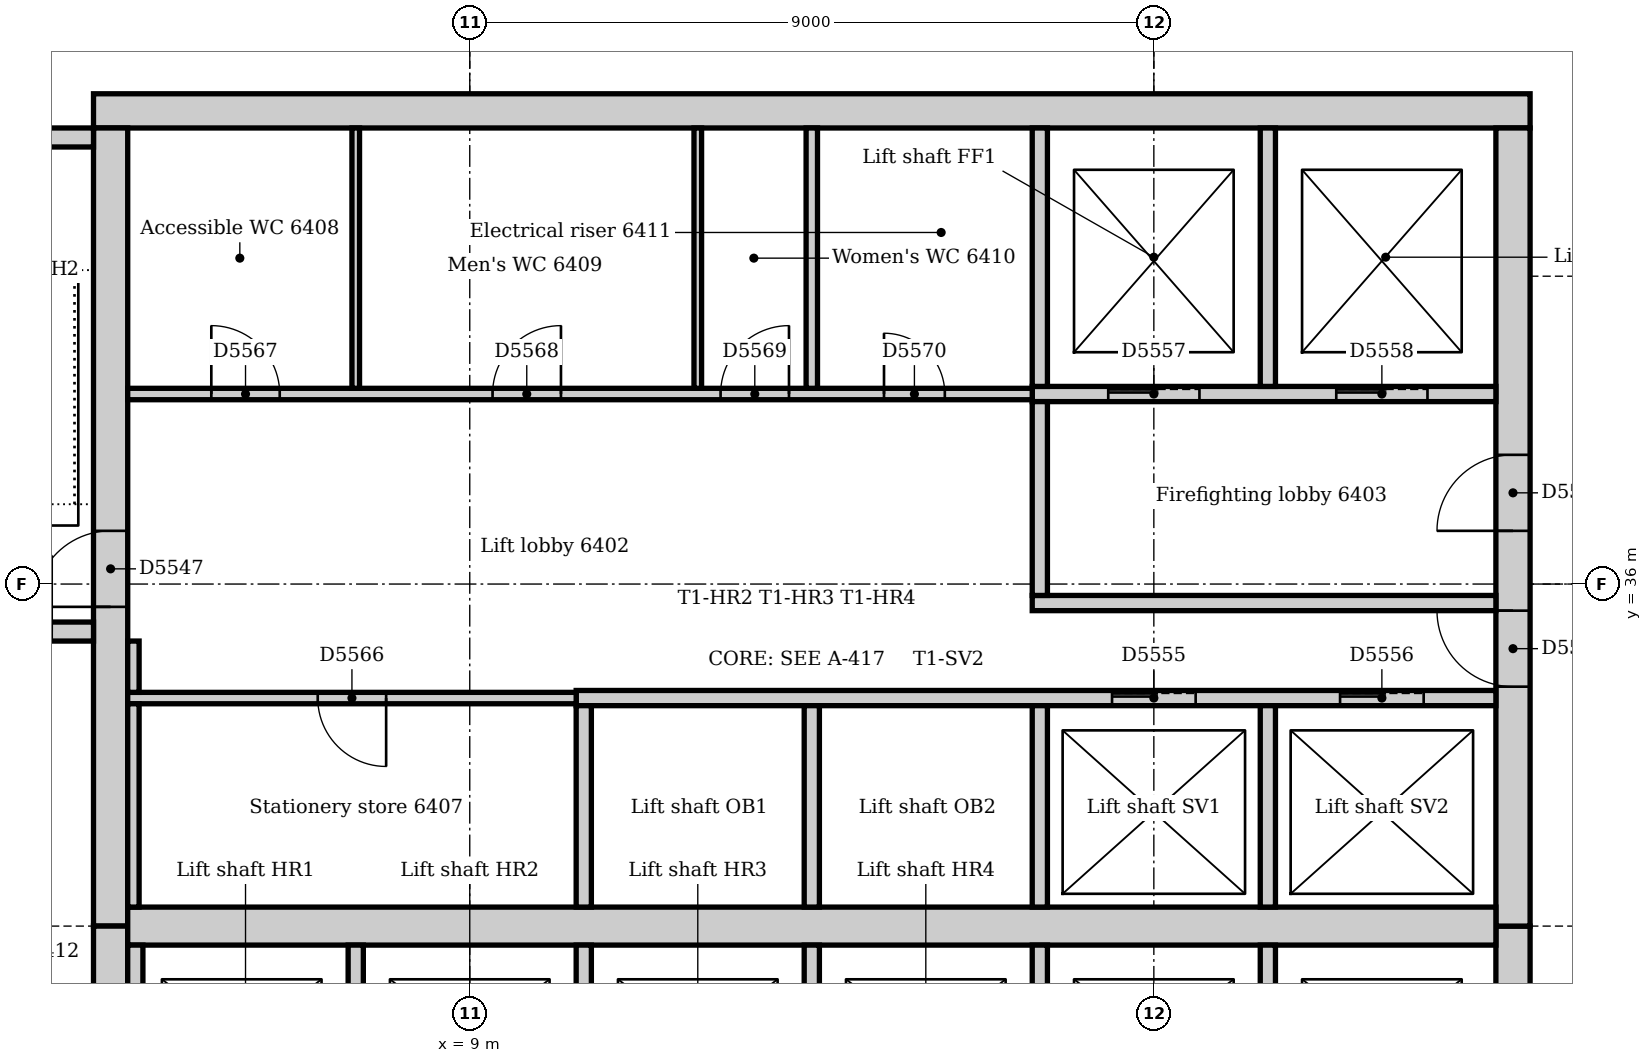
"""IFC4 building model, lengths in metres.
Left out: names, types, materials, properties, quantities, classifications, styles, units other than length and angle.
Written with IfcOpenShell. Run it as: python <this file> out.ifc"""

import sys

from ifc_helpers import new_model, si_unit, direction, frame, frame_2d, origin, place, context, subcontext, project, spatial, rectangle, extrude, element, fill, save


model = new_model("IFC4")
c1 = context("Model", 3, precision=1e-05, world=origin(), true_north=direction((0.0, 1.0)))
c2 = subcontext(c1, "Body", "Model", "MODEL_VIEW")
j1 = project(units=[si_unit("LENGTHUNIT", "METRE"), si_unit("PLANEANGLEUNIT", "RADIAN")], contexts=[c1])
p1 = place(None, origin())
s1 = spatial("IfcSite", under=j1, at=p1, CompositionType="ELEMENT")
p2 = place(p1, origin())
s2 = spatial("IfcBuilding", under=s1, at=p2, CompositionType="ELEMENT")
p3 = place(p2, frame((0.0, 0.0, 267.0)))
s3 = spatial("IfcBuildingStorey", under=s2, at=p3, CompositionType="ELEMENT", Elevation=267.0)
p4 = place(p3, frame((22.95, 42.225, 0.0), z_axis=(0.0, 0.0, 1.0), x_axis=(-1.0, 0.0, 0.0)))
e1 = element("IfcWall", 1, at=p4, inside=s3, PredefinedType="SOLIDWALL", context=c2, shape_type="SweptSolid", body=[
    extrude(rectangle(XDim=18.9, YDim=0.45, at=frame_2d((9.45, 0.0))), origin(), (0.0, 0.0, 1.0), 4.0),
])
p5 = place(p3, frame((22.725, 21.0, 0.0), z_axis=(0.0, 0.0, 1.0), x_axis=(0.0, 1.0, 0.0)))
e2 = element("IfcWall", 2, at=p5, inside=s3, PredefinedType="SOLIDWALL", context=c2, shape_type="SweptSolid", body=[
    extrude(rectangle(XDim=10.5, YDim=0.45, at=frame_2d((5.25, 0.0))), origin(), (0.0, 0.0, 1.0), 4.0),
])
p6 = place(p5, frame((4.35, 0.0, 0.0)))
e3 = element("IfcOpeningElement", 3, at=p6, cuts=e2, PredefinedType="OPENING", context=c2, shape_type="SweptSolid", body=[
    extrude(rectangle(XDim=1.8, YDim=2.1, at=frame_2d((0.9, 1.05))), frame((0.0, 0.235, 0.0), z_axis=(0.0, -1.0, 0.0), x_axis=(1.0, 0.0, 0.0)), (0.0, 0.0, 1.0), 0.47),
])
p7 = place(p3, frame((22.725, 31.5, 0.0), z_axis=(0.0, 0.0, 1.0), x_axis=(0.0, 1.0, 0.0)))
e4 = element("IfcWall", 4, at=p7, inside=s3, PredefinedType="SOLIDWALL", context=c2, shape_type="SweptSolid", body=[
    extrude(rectangle(XDim=10.5, YDim=0.45, at=frame_2d((5.25, 0.0))), origin(), (0.0, 0.0, 1.0), 4.0),
])
p8 = place(p7, frame((3.15, 0.0, 0.0)))
e5 = element("IfcOpeningElement", 5, at=p8, cuts=e4, PredefinedType="OPENING", context=c2, shape_type="SweptSolid", body=[
    extrude(rectangle(XDim=1.0, YDim=2.1, at=frame_2d((0.5, 1.05))), frame((0.0, 0.235, 0.0), z_axis=(0.0, -1.0, 0.0), x_axis=(1.0, 0.0, 0.0)), (0.0, 0.0, 1.0), 0.47),
])
p9 = place(p7, frame((5.2, 0.0, 0.0)))
e6 = element("IfcOpeningElement", 6, at=p9, cuts=e4, PredefinedType="OPENING", context=c2, shape_type="SweptSolid", body=[
    extrude(rectangle(XDim=1.0, YDim=2.1, at=frame_2d((0.5, 1.05))), frame((0.0, 0.235, 0.0), z_axis=(0.0, -1.0, 0.0), x_axis=(1.0, 0.0, 0.0)), (0.0, 0.0, 1.0), 0.47),
])
p10 = place(p3, frame((4.275, 42.0, 0.0), z_axis=(0.0, 0.0, 1.0), x_axis=(0.0, -1.0, 0.0)))
e7 = element("IfcWall", 7, at=p10, inside=s3, PredefinedType="SOLIDWALL", context=c2, shape_type="SweptSolid", body=[
    extrude(rectangle(XDim=10.5, YDim=0.45, at=frame_2d((5.25, 0.0))), origin(), (0.0, 0.0, 1.0), 4.0),
])
p11 = place(p10, frame((5.3, 0.0, 0.0)))
e8 = element("IfcOpeningElement", 8, at=p11, cuts=e7, PredefinedType="OPENING", context=c2, shape_type="SweptSolid", body=[
    extrude(rectangle(XDim=1.0, YDim=2.1, at=frame_2d((0.5, 1.05))), frame((0.0, 0.235, 0.0), z_axis=(0.0, -1.0, 0.0), x_axis=(1.0, 0.0, 0.0)), (0.0, 0.0, 1.0), 0.47),
])
p12 = place(p3, frame((4.275, 31.5, 0.0), z_axis=(0.0, 0.0, 1.0), x_axis=(0.0, -1.0, 0.0)))
e9 = element("IfcWall", 9, at=p12, inside=s3, PredefinedType="SOLIDWALL", context=c2, shape_type="SweptSolid", body=[
    extrude(rectangle(XDim=10.5, YDim=0.45, at=frame_2d((5.25, 0.0))), origin(), (0.0, 0.0, 1.0), 4.0),
])
p13 = place(p12, frame((4.25, 0.0, 0.0)))
e10 = element("IfcOpeningElement", 10, at=p13, cuts=e9, PredefinedType="OPENING", context=c2, shape_type="SweptSolid", body=[
    extrude(rectangle(XDim=1.0, YDim=2.1, at=frame_2d((0.5, 1.05))), frame((0.0, 0.235, 0.0), z_axis=(0.0, -1.0, 0.0), x_axis=(1.0, 0.0, 0.0)), (0.0, 0.0, 1.0), 0.47),
])
p14 = place(p3, frame((4.5, 31.5, 0.0), z_axis=(0.0, 0.0, 1.0), x_axis=(1.0, 0.0, 0.0)))
e11 = element("IfcWall", 11, at=p14, inside=s3, PredefinedType="SOLIDWALL", context=c2, shape_type="SweptSolid", body=[
    extrude(rectangle(XDim=18.0, YDim=0.5, at=frame_2d((9.0, 0.0))), origin(), (0.0, 0.0, 1.0), 4.0),
])
p15 = place(p3, frame((0.36, 35.375, 0.0), z_axis=(0.0, 0.0, 1.0), x_axis=(1.0, 0.0, 0.0)))
e12 = element("IfcWall", 12, at=p15, inside=s3, PredefinedType="SOLIDWALL", context=c2, shape_type="SweptSolid", body=[
    extrude(rectangle(XDim=3.69, YDim=0.25, at=frame_2d((1.845, 0.0))), origin(), (0.0, 0.0, 1.0), 4.0),
])
p16 = place(p15, frame((2.14, 0.0, 0.0)))
e13 = element("IfcOpeningElement", 13, at=p16, cuts=e12, PredefinedType="OPENING", context=c2, shape_type="SweptSolid", body=[
    extrude(rectangle(XDim=1.0, YDim=2.1, at=frame_2d((0.5, 1.05))), frame((0.0, 0.135, 0.0), z_axis=(0.0, -1.0, 0.0), x_axis=(1.0, 0.0, 0.0)), (0.0, 0.0, 1.0), 0.27),
])
p17 = place(p3, frame((4.05, 41.875, 0.0), z_axis=(0.0, 0.0, 1.0), x_axis=(-1.0, 0.0, 0.0)))
e14 = element("IfcWall", 14, at=p17, inside=s3, PredefinedType="SOLIDWALL", context=c2, shape_type="SweptSolid", body=[
    extrude(rectangle(XDim=3.69, YDim=0.25, at=frame_2d((1.845, 0.0))), origin(), (0.0, 0.0, 1.0), 4.0),
])
p18 = place(p3, frame((16.4, 35.75, 0.0), z_axis=(0.0, 0.0, 1.0), x_axis=(1.0, 0.0, 0.0)))
e15 = element("IfcWall", 15, at=p18, inside=s3, PredefinedType="PARTITIONING", context=c2, shape_type="SweptSolid", body=[
    extrude(rectangle(XDim=6.1, YDim=0.2, at=frame_2d((3.05, 0.0))), origin(), (0.0, 0.0, 1.0), 3.85),
])
p19 = place(p3, frame((16.4, 38.5, 0.0), z_axis=(0.0, 0.0, 1.0), x_axis=(1.0, 0.0, 0.0)))
e16 = element("IfcWall", 16, at=p19, inside=s3, PredefinedType="PARTITIONING", context=c2, shape_type="SweptSolid", body=[
    extrude(rectangle(XDim=6.1, YDim=0.2, at=frame_2d((3.05, 0.0))), origin(), (0.0, 0.0, 1.0), 3.85),
])
p20 = place(p19, frame((1.0, 0.0, 0.0)))
e17 = element("IfcOpeningElement", 17, at=p20, cuts=e16, PredefinedType="OPENING", context=c2, shape_type="SweptSolid", body=[
    extrude(rectangle(XDim=1.2, YDim=2.1, at=frame_2d((0.6, 1.05))), frame((0.0, 0.11, 0.0), z_axis=(0.0, -1.0, 0.0), x_axis=(1.0, 0.0, 0.0)), (0.0, 0.0, 1.0), 0.22),
])
p21 = place(p19, frame((4.0, 0.0, 0.0)))
e18 = element("IfcOpeningElement", 18, at=p21, cuts=e16, PredefinedType="OPENING", context=c2, shape_type="SweptSolid", body=[
    extrude(rectangle(XDim=1.2, YDim=2.1, at=frame_2d((0.6, 1.05))), frame((0.0, 0.11, 0.0), z_axis=(0.0, -1.0, 0.0), x_axis=(1.0, 0.0, 0.0)), (0.0, 0.0, 1.0), 0.22),
])
p22 = place(p3, frame((16.5, 35.85, 0.0), z_axis=(0.0, 0.0, 1.0), x_axis=(0.0, 1.0, 0.0)))
e19 = element("IfcWall", 19, at=p22, inside=s3, PredefinedType="PARTITIONING", context=c2, shape_type="SweptSolid", body=[
    extrude(rectangle(XDim=2.55, YDim=0.2, at=frame_2d((1.275, 0.0))), origin(), (0.0, 0.0, 1.0), 3.85),
])
p23 = place(p3, frame((10.4, 34.5, 0.0), z_axis=(0.0, 0.0, 1.0), x_axis=(1.0, 0.0, 0.0)))
e20 = element("IfcWall", 20, at=p23, inside=s3, PredefinedType="PARTITIONING", context=c2, shape_type="SweptSolid", body=[
    extrude(rectangle(XDim=12.1, YDim=0.2, at=frame_2d((6.05, 0.0))), origin(), (0.0, 0.0, 1.0), 3.85),
])
p24 = place(p23, frame((7.05, 0.0, 0.0)))
e21 = element("IfcOpeningElement", 21, at=p24, cuts=e20, PredefinedType="OPENING", context=c2, shape_type="SweptSolid", body=[
    extrude(rectangle(XDim=1.1, YDim=2.1, at=frame_2d((0.55, 1.05))), frame((0.0, 0.11, 0.0), z_axis=(0.0, -1.0, 0.0), x_axis=(1.0, 0.0, 0.0)), (0.0, 0.0, 1.0), 0.22),
])
p25 = place(p23, frame((10.05, 0.0, 0.0)))
e22 = element("IfcOpeningElement", 22, at=p25, cuts=e20, PredefinedType="OPENING", context=c2, shape_type="SweptSolid", body=[
    extrude(rectangle(XDim=1.1, YDim=2.1, at=frame_2d((0.55, 1.05))), frame((0.0, 0.11, 0.0), z_axis=(0.0, -1.0, 0.0), x_axis=(1.0, 0.0, 0.0)), (0.0, 0.0, 1.0), 0.22),
])
for number, where, z_axis, x_axis in (
    (23, (10.5, 28.6, 0.0), (0.0, 0.0, 1.0), (0.0, 1.0, 0.0)),
    (24, (10.5, 31.75, 0.0), (0.0, 0.0, 1.0), (0.0, 1.0, 0.0)),
    (25, (13.5, 28.6, 0.0), (0.0, 0.0, 1.0), (0.0, 1.0, 0.0)),
    (26, (13.5, 31.75, 0.0), (0.0, 0.0, 1.0), (0.0, 1.0, 0.0)),
    (27, (16.5, 28.6, 0.0), (0.0, 0.0, 1.0), (0.0, 1.0, 0.0)),
    (28, (16.5, 31.75, 0.0), (0.0, 0.0, 1.0), (0.0, 1.0, 0.0)),
    (29, (19.5, 28.6, 0.0), (0.0, 0.0, 1.0), (0.0, 1.0, 0.0)),
    (30, (19.5, 31.75, 0.0), (0.0, 0.0, 1.0), (0.0, 1.0, 0.0)),
):
    element("IfcWall", number, at=place(p3, frame(where, z_axis=z_axis, x_axis=x_axis)), inside=s3, PredefinedType="PARTITIONING", context=c2, shape_type="SweptSolid", body=[
        extrude(rectangle(XDim=2.65, YDim=0.2, at=frame_2d((1.325, 0.0))), origin(), (0.0, 0.0, 1.0), 3.85),
    ])
for number, where, z_axis, x_axis in (
    (31, (16.5, 38.6, 0.0), (0.0, 0.0, 1.0), (0.0, 1.0, 0.0)),
    (32, (19.5, 38.6, 0.0), (0.0, 0.0, 1.0), (0.0, 1.0, 0.0)),
):
    element("IfcWall", number, at=place(p3, frame(where, z_axis=z_axis, x_axis=x_axis)), inside=s3, PredefinedType="PARTITIONING", context=c2, shape_type="SweptSolid", body=[
        extrude(rectangle(XDim=3.4, YDim=0.2, at=frame_2d((1.7, 0.0))), origin(), (0.0, 0.0, 1.0), 3.85),
    ])
for number, where, z_axis, x_axis in (
    (33, (4.6, 28.6, 0.0), (0.0, 0.0, 1.0), (0.0, 1.0, 0.0)),
    (34, (7.5, 28.6, 0.0), (0.0, 0.0, 1.0), (0.0, 1.0, 0.0)),
):
    element("IfcWall", number, at=place(p3, frame(where, z_axis=z_axis, x_axis=x_axis)), inside=s3, PredefinedType="PARTITIONING", context=c2, shape_type="SweptSolid", body=[
        extrude(rectangle(XDim=2.65, YDim=0.2, at=frame_2d((1.325, 0.0))), origin(), (0.0, 0.0, 1.0), 3.85),
    ])
p26 = place(p3, frame((4.5, 38.5, 0.0), z_axis=(0.0, 0.0, 1.0), x_axis=(1.0, 0.0, 0.0)))
e35 = element("IfcWall", 35, at=p26, inside=s3, PredefinedType="PARTITIONING", context=c2, shape_type="SweptSolid", body=[
    extrude(rectangle(XDim=11.9, YDim=0.15, at=frame_2d((5.95, 0.0))), origin(), (0.0, 0.0, 1.0), 3.85),
])
p27 = place(p26, frame((1.1, 0.0, 0.0)))
e36 = element("IfcOpeningElement", 36, at=p27, cuts=e35, PredefinedType="OPENING", context=c2, shape_type="SweptSolid", body=[
    extrude(rectangle(XDim=0.9, YDim=2.1, at=frame_2d((0.45, 1.05))), frame((0.0, 0.085, 0.0), z_axis=(0.0, -1.0, 0.0), x_axis=(1.0, 0.0, 0.0)), (0.0, 0.0, 1.0), 0.17),
])
p28 = place(p26, frame((4.8, 0.0, 0.0)))
e37 = element("IfcOpeningElement", 37, at=p28, cuts=e35, PredefinedType="OPENING", context=c2, shape_type="SweptSolid", body=[
    extrude(rectangle(XDim=0.9, YDim=2.1, at=frame_2d((0.45, 1.05))), frame((0.0, 0.085, 0.0), z_axis=(0.0, -1.0, 0.0), x_axis=(1.0, 0.0, 0.0)), (0.0, 0.0, 1.0), 0.17),
])
p29 = place(p26, frame((7.8, 0.0, 0.0)))
e38 = element("IfcOpeningElement", 38, at=p29, cuts=e35, PredefinedType="OPENING", context=c2, shape_type="SweptSolid", body=[
    extrude(rectangle(XDim=0.9, YDim=2.1, at=frame_2d((0.45, 1.05))), frame((0.0, 0.085, 0.0), z_axis=(0.0, -1.0, 0.0), x_axis=(1.0, 0.0, 0.0)), (0.0, 0.0, 1.0), 0.17),
])
p30 = place(p26, frame((9.95, 0.0, 0.0)))
e39 = element("IfcOpeningElement", 39, at=p30, cuts=e35, PredefinedType="OPENING", context=c2, shape_type="SweptSolid", body=[
    extrude(rectangle(XDim=0.8, YDim=2.1, at=frame_2d((0.4, 1.05))), frame((0.0, 0.085, 0.0), z_axis=(0.0, -1.0, 0.0), x_axis=(1.0, 0.0, 0.0)), (0.0, 0.0, 1.0), 0.17),
])
p31 = place(p3, frame((4.5, 34.5, 0.0), z_axis=(0.0, 0.0, 1.0), x_axis=(1.0, 0.0, 0.0)))
e40 = element("IfcWall", 40, at=p31, inside=s3, PredefinedType="PARTITIONING", context=c2, shape_type="SweptSolid", body=[
    extrude(rectangle(XDim=5.9, YDim=0.15, at=frame_2d((2.95, 0.0))), origin(), (0.0, 0.0, 1.0), 3.85),
])
p32 = place(p31, frame((2.5, 0.0, 0.0)))
e41 = element("IfcOpeningElement", 41, at=p32, cuts=e40, PredefinedType="OPENING", context=c2, shape_type="SweptSolid", body=[
    extrude(rectangle(XDim=0.9, YDim=2.1, at=frame_2d((0.45, 1.05))), frame((0.0, 0.085, 0.0), z_axis=(0.0, -1.0, 0.0), x_axis=(1.0, 0.0, 0.0)), (0.0, 0.0, 1.0), 0.17),
])
p33 = place(p3, frame((4.575, 34.575, 0.0), z_axis=(0.0, 0.0, 1.0), x_axis=(0.0, 1.0, 0.0)))
e42 = element("IfcWall", 42, at=p33, inside=s3, PredefinedType="PARTITIONING", context=c2, shape_type="SweptSolid", body=[
    extrude(rectangle(XDim=0.675, YDim=0.15, at=frame_2d((0.338, 0.0))), origin(), (0.0, 0.0, 1.0), 3.85),
])
p34 = place(p3, frame((4.575, 31.75, 0.0), z_axis=(0.0, 0.0, 1.0), x_axis=(0.0, 1.0, 0.0)))
e43 = element("IfcWall", 43, at=p34, inside=s3, PredefinedType="PARTITIONING", context=c2, shape_type="SweptSolid", body=[
    extrude(rectangle(XDim=2.675, YDim=0.15, at=frame_2d((1.337, 0.0))), origin(), (0.0, 0.0, 1.0), 3.85),
])
p35 = place(p3, frame((13.5, 38.575, 0.0), z_axis=(0.0, 0.0, 1.0), x_axis=(0.0, 1.0, 0.0)))
e44 = element("IfcWall", 44, at=p35, inside=s3, PredefinedType="PARTITIONING", context=c2, shape_type="SweptSolid", body=[
    extrude(rectangle(XDim=3.425, YDim=0.15, at=frame_2d((1.712, 0.0))), origin(), (0.0, 0.0, 1.0), 3.85),
])
for number, where, z_axis, x_axis in (
    (45, (7.5, 38.575, 0.0), (0.0, 0.0, 1.0), (0.0, 1.0, 0.0)),
    (46, (12.0, 38.575, 0.0), (0.0, 0.0, 1.0), (0.0, 1.0, 0.0)),
):
    element("IfcWall", number, at=place(p3, frame(where, z_axis=z_axis, x_axis=x_axis)), inside=s3, PredefinedType="PARTITIONING", context=c2, shape_type="SweptSolid", body=[
        extrude(rectangle(XDim=3.425, YDim=0.1, at=frame_2d((1.712, 0.0))), origin(), (0.0, 0.0, 1.0), 3.85),
    ])
p36 = place(p11, frame((1.0, 0.0, 0.0), z_axis=(0.0, 0.0, 1.0), x_axis=(-1.0, 0.0, 0.0)))
e47 = element("IfcDoor", 47, at=p36, inside=s3, OperationType="SINGLE_SWING_LEFT", PredefinedType="DOOR", context=c2, shape_type="SweptSolid", body=[
    extrude(rectangle(XDim=1.0, YDim=2.1, at=frame_2d((0.5, 1.05))), frame((0.0, 0.025, 0.0), z_axis=(0.0, -1.0, 0.0), x_axis=(1.0, 0.0, 0.0)), (0.0, 0.0, 1.0), 0.05),
])
fill(e8, e47)
p37 = place(p24, origin())
e48 = element("IfcDoor", 48, at=p37, inside=s3, OperationType="SLIDING_TO_LEFT", PredefinedType="DOOR", context=c2, shape_type="SweptSolid", body=[
    extrude(rectangle(XDim=1.1, YDim=2.1, at=frame_2d((0.55, 1.05))), frame((0.0, 0.025, 0.0), z_axis=(0.0, -1.0, 0.0), x_axis=(1.0, 0.0, 0.0)), (0.0, 0.0, 1.0), 0.05),
])
fill(e21, e48)
p38 = place(p25, origin())
e49 = element("IfcDoor", 49, at=p38, inside=s3, OperationType="SLIDING_TO_LEFT", PredefinedType="DOOR", context=c2, shape_type="SweptSolid", body=[
    extrude(rectangle(XDim=1.1, YDim=2.1, at=frame_2d((0.55, 1.05))), frame((0.0, 0.025, 0.0), z_axis=(0.0, -1.0, 0.0), x_axis=(1.0, 0.0, 0.0)), (0.0, 0.0, 1.0), 0.05),
])
fill(e22, e49)
p39 = place(p20, origin())
e50 = element("IfcDoor", 50, at=p39, inside=s3, OperationType="SLIDING_TO_LEFT", PredefinedType="DOOR", context=c2, shape_type="SweptSolid", body=[
    extrude(rectangle(XDim=1.2, YDim=2.1, at=frame_2d((0.6, 1.05))), frame((0.0, 0.025, 0.0), z_axis=(0.0, -1.0, 0.0), x_axis=(1.0, 0.0, 0.0)), (0.0, 0.0, 1.0), 0.05),
])
fill(e17, e50)
p40 = place(p21, origin())
e51 = element("IfcDoor", 51, at=p40, inside=s3, OperationType="SLIDING_TO_LEFT", PredefinedType="DOOR", context=c2, shape_type="SweptSolid", body=[
    extrude(rectangle(XDim=1.2, YDim=2.1, at=frame_2d((0.6, 1.05))), frame((0.0, 0.025, 0.0), z_axis=(0.0, -1.0, 0.0), x_axis=(1.0, 0.0, 0.0)), (0.0, 0.0, 1.0), 0.05),
])
fill(e18, e51)
p41 = place(p8, origin())
e52 = element("IfcDoor", 52, at=p41, inside=s3, OperationType="SINGLE_SWING_RIGHT", PredefinedType="DOOR", context=c2, shape_type="SweptSolid", body=[
    extrude(rectangle(XDim=1.0, YDim=2.1, at=frame_2d((0.5, 1.05))), frame((0.0, 0.025, 0.0), z_axis=(0.0, -1.0, 0.0), x_axis=(1.0, 0.0, 0.0)), (0.0, 0.0, 1.0), 0.05),
])
fill(e5, e52)
p42 = place(p9, origin())
e53 = element("IfcDoor", 53, at=p42, inside=s3, OperationType="SINGLE_SWING_LEFT", PredefinedType="DOOR", context=c2, shape_type="SweptSolid", body=[
    extrude(rectangle(XDim=1.0, YDim=2.1, at=frame_2d((0.5, 1.05))), frame((0.0, 0.025, 0.0), z_axis=(0.0, -1.0, 0.0), x_axis=(1.0, 0.0, 0.0)), (0.0, 0.0, 1.0), 0.05),
])
fill(e6, e53)
p43 = place(p32, frame((0.9, 0.0, 0.0), z_axis=(0.0, 0.0, 1.0), x_axis=(-1.0, 0.0, 0.0)))
e54 = element("IfcDoor", 54, at=p43, inside=s3, OperationType="SINGLE_SWING_LEFT", PredefinedType="DOOR", context=c2, shape_type="SweptSolid", body=[
    extrude(rectangle(XDim=0.9, YDim=2.1, at=frame_2d((0.45, 1.05))), frame((0.0, 0.025, 0.0), z_axis=(0.0, -1.0, 0.0), x_axis=(1.0, 0.0, 0.0)), (0.0, 0.0, 1.0), 0.05),
])
fill(e41, e54)
p44 = place(p27, origin())
e55 = element("IfcDoor", 55, at=p44, inside=s3, OperationType="SINGLE_SWING_LEFT", PredefinedType="DOOR", context=c2, shape_type="SweptSolid", body=[
    extrude(rectangle(XDim=0.9, YDim=2.1, at=frame_2d((0.45, 1.05))), frame((0.0, 0.025, 0.0), z_axis=(0.0, -1.0, 0.0), x_axis=(1.0, 0.0, 0.0)), (0.0, 0.0, 1.0), 0.05),
])
fill(e36, e55)
p45 = place(p28, origin())
e56 = element("IfcDoor", 56, at=p45, inside=s3, OperationType="SINGLE_SWING_RIGHT", PredefinedType="DOOR", context=c2, shape_type="SweptSolid", body=[
    extrude(rectangle(XDim=0.9, YDim=2.1, at=frame_2d((0.45, 1.05))), frame((0.0, 0.025, 0.0), z_axis=(0.0, -1.0, 0.0), x_axis=(1.0, 0.0, 0.0)), (0.0, 0.0, 1.0), 0.05),
])
fill(e37, e56)
p46 = place(p29, origin())
e57 = element("IfcDoor", 57, at=p46, inside=s3, OperationType="SINGLE_SWING_RIGHT", PredefinedType="DOOR", context=c2, shape_type="SweptSolid", body=[
    extrude(rectangle(XDim=0.9, YDim=2.1, at=frame_2d((0.45, 1.05))), frame((0.0, 0.025, 0.0), z_axis=(0.0, -1.0, 0.0), x_axis=(1.0, 0.0, 0.0)), (0.0, 0.0, 1.0), 0.05),
])
fill(e38, e57)
p47 = place(p30, origin())
e58 = element("IfcDoor", 58, at=p47, inside=s3, OperationType="SINGLE_SWING_LEFT", PredefinedType="DOOR", context=c2, shape_type="SweptSolid", body=[
    extrude(rectangle(XDim=0.8, YDim=2.1, at=frame_2d((0.4, 1.05))), frame((0.0, 0.025, 0.0), z_axis=(0.0, -1.0, 0.0), x_axis=(1.0, 0.0, 0.0)), (0.0, 0.0, 1.0), 0.05),
])
fill(e39, e58)
save(model, sys.argv[1])
